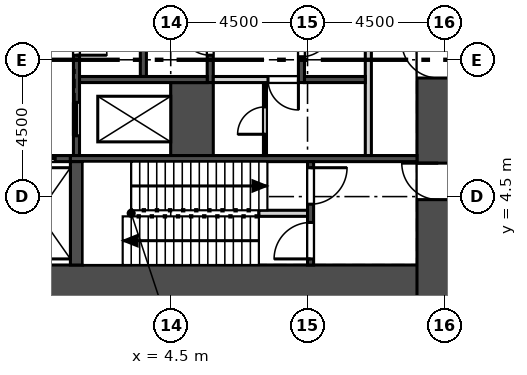
"""IFC4 building model, lengths in metres.
Left out: names, types, materials, properties, quantities, classifications, styles, units other than length and angle.
Written with IfcOpenShell. Run it as: python <this file> out.ifc"""

import sys

from ifc_helpers import new_model, si_unit, direction, frame, frame_2d, origin, place, context, subcontext, project, spatial, rectangle, extrude, element, fill, save


model = new_model("IFC4")
c1 = context("Model", 3, precision=1e-05, world=origin(), true_north=direction((0.0, 1.0)))
c2 = subcontext(c1, "Body", "Model", "MODEL_VIEW")
j1 = project(units=[si_unit("LENGTHUNIT", "METRE"), si_unit("PLANEANGLEUNIT", "RADIAN")], contexts=[c1])
p1 = place(None, origin())
s1 = spatial("IfcSite", under=j1, at=p1, CompositionType="ELEMENT")
p2 = place(p1, origin())
s2 = spatial("IfcBuilding", under=s1, at=p2, CompositionType="ELEMENT")
p3 = place(p2, frame((0.0, 0.0, 47.5)))
s3 = spatial("IfcBuildingStorey", under=s2, at=p3, CompositionType="ELEMENT", Elevation=47.5)
p4 = place(p3, frame((-14.0, 1.55, 0.0), z_axis=(0.0, 0.0, 1.0), x_axis=(1.0, 0.0, 0.0)))
e1 = element("IfcWall", 1, at=p4, inside=s3, PredefinedType="SHEAR", context=c2, shape_type="SweptSolid", body=[
    extrude(rectangle(XDim=28.0, YDim=1.4, at=frame_2d((14.0, 0.0))), origin(), (0.0, 0.0, 1.0), 5.4),
])
p5 = place(p3, frame((13.3, 0.85, 0.0), z_axis=(0.0, 0.0, 1.0), x_axis=(0.0, 1.0, 0.0)))
e2 = element("IfcWall", 2, at=p5, inside=s3, PredefinedType="SHEAR", context=c2, shape_type="SweptSolid", body=[
    extrude(rectangle(XDim=10.202, YDim=1.4, at=frame_2d((5.101, 0.0))), origin(), (0.0, 0.0, 1.0), 5.4),
])
p6 = place(p5, frame((3.55, 0.0, 0.0)))
e3 = element("IfcOpeningElement", 3, at=p6, cuts=e2, PredefinedType="OPENING", context=c2, shape_type="SweptSolid", body=[
    extrude(rectangle(XDim=1.2, YDim=2.1, at=frame_2d((0.6, 1.05))), frame((0.0, 0.71, 0.0), z_axis=(0.0, -1.0, 0.0), x_axis=(1.0, 0.0, 0.0)), (0.0, 0.0, 1.0), 1.42),
])
p7 = place(p5, frame((7.55, 0.0, 0.0)))
e4 = element("IfcOpeningElement", 4, at=p7, cuts=e2, PredefinedType="OPENING", context=c2, shape_type="SweptSolid", body=[
    extrude(rectangle(XDim=1.2, YDim=2.1, at=frame_2d((0.6, 1.05))), frame((0.0, 0.71, 0.0), z_axis=(0.0, -1.0, 0.0), x_axis=(1.0, 0.0, 0.0)), (0.0, 0.0, 1.0), 1.42),
])
p8 = place(p3, frame((31.98, 7.709, 0.0), z_axis=(0.0, 0.0, 1.0), x_axis=(-0.500000125387, 0.866025331392, 0.0)))
e5 = element("IfcWall", 5, at=p8, inside=s3, PredefinedType="SOLIDWALL", context=c2, shape_type="SweptSolid", body=[
    extrude(rectangle(XDim=55.255, YDim=0.34, at=frame_2d((27.628, 0.0))), origin(), (0.0, 0.0, 1.0), 5.1),
])
p9 = place(p8, frame((1.314, 0.0, 0.9)))
e6 = element("IfcOpeningElement", 6, at=p9, cuts=e5, PredefinedType="OPENING", context=c2, shape_type="SweptSolid", body=[
    extrude(rectangle(XDim=1.885, YDim=3.0, at=frame_2d((0.942, 1.5))), frame((0.0, 0.18, 0.0), z_axis=(0.0, -1.0, 0.0), x_axis=(1.0, 0.0, 0.0)), (0.0, 0.0, 1.0), 0.36),
])
p10 = place(p8, frame((4.314, 0.0, 0.9)))
e7 = element("IfcOpeningElement", 7, at=p10, cuts=e5, PredefinedType="OPENING", context=c2, shape_type="SweptSolid", body=[
    extrude(rectangle(XDim=1.885, YDim=3.0, at=frame_2d((0.942, 1.5))), frame((0.0, 0.18, 0.0), z_axis=(0.0, -1.0, 0.0), x_axis=(1.0, 0.0, 0.0)), (0.0, 0.0, 1.0), 0.36),
])
p11 = place(p8, frame((7.314, 0.0, 0.9)))
e8 = element("IfcOpeningElement", 8, at=p11, cuts=e5, PredefinedType="OPENING", context=c2, shape_type="SweptSolid", body=[
    extrude(rectangle(XDim=1.885, YDim=3.0, at=frame_2d((0.942, 1.5))), frame((0.0, 0.18, 0.0), z_axis=(0.0, -1.0, 0.0), x_axis=(1.0, 0.0, 0.0)), (0.0, 0.0, 1.0), 0.36),
])
p12 = place(p8, frame((10.314, 0.0, 0.9)))
e9 = element("IfcOpeningElement", 9, at=p12, cuts=e5, PredefinedType="OPENING", context=c2, shape_type="SweptSolid", body=[
    extrude(rectangle(XDim=1.885, YDim=3.0, at=frame_2d((0.942, 1.5))), frame((0.0, 0.18, 0.0), z_axis=(0.0, -1.0, 0.0), x_axis=(1.0, 0.0, 0.0)), (0.0, 0.0, 1.0), 0.36),
])
p13 = place(p8, frame((13.314, 0.0, 0.9)))
e10 = element("IfcOpeningElement", 10, at=p13, cuts=e5, PredefinedType="OPENING", context=c2, shape_type="SweptSolid", body=[
    extrude(rectangle(XDim=1.885, YDim=3.0, at=frame_2d((0.942, 1.5))), frame((0.0, 0.18, 0.0), z_axis=(0.0, -1.0, 0.0), x_axis=(1.0, 0.0, 0.0)), (0.0, 0.0, 1.0), 0.36),
])
p14 = place(p8, frame((16.314, 0.0, 0.9)))
e11 = element("IfcOpeningElement", 11, at=p14, cuts=e5, PredefinedType="OPENING", context=c2, shape_type="SweptSolid", body=[
    extrude(rectangle(XDim=1.885, YDim=3.0, at=frame_2d((0.942, 1.5))), frame((0.0, 0.18, 0.0), z_axis=(0.0, -1.0, 0.0), x_axis=(1.0, 0.0, 0.0)), (0.0, 0.0, 1.0), 0.36),
])
p15 = place(p8, frame((19.314, 0.0, 0.9)))
e12 = element("IfcOpeningElement", 12, at=p15, cuts=e5, PredefinedType="OPENING", context=c2, shape_type="SweptSolid", body=[
    extrude(rectangle(XDim=1.885, YDim=3.0, at=frame_2d((0.942, 1.5))), frame((0.0, 0.18, 0.0), z_axis=(0.0, -1.0, 0.0), x_axis=(1.0, 0.0, 0.0)), (0.0, 0.0, 1.0), 0.36),
])
p16 = place(p8, frame((22.314, 0.0, 0.9)))
e13 = element("IfcOpeningElement", 13, at=p16, cuts=e5, PredefinedType="OPENING", context=c2, shape_type="SweptSolid", body=[
    extrude(rectangle(XDim=1.885, YDim=3.0, at=frame_2d((0.942, 1.5))), frame((0.0, 0.18, 0.0), z_axis=(0.0, -1.0, 0.0), x_axis=(1.0, 0.0, 0.0)), (0.0, 0.0, 1.0), 0.36),
])
p17 = place(p8, frame((25.314, 0.0, 0.9)))
e14 = element("IfcOpeningElement", 14, at=p17, cuts=e5, PredefinedType="OPENING", context=c2, shape_type="SweptSolid", body=[
    extrude(rectangle(XDim=1.885, YDim=3.0, at=frame_2d((0.942, 1.5))), frame((0.0, 0.18, 0.0), z_axis=(0.0, -1.0, 0.0), x_axis=(1.0, 0.0, 0.0)), (0.0, 0.0, 1.0), 0.36),
])
p18 = place(p8, frame((28.314, 0.0, 0.9)))
e15 = element("IfcOpeningElement", 15, at=p18, cuts=e5, PredefinedType="OPENING", context=c2, shape_type="SweptSolid", body=[
    extrude(rectangle(XDim=1.885, YDim=3.0, at=frame_2d((0.942, 1.5))), frame((0.0, 0.18, 0.0), z_axis=(0.0, -1.0, 0.0), x_axis=(1.0, 0.0, 0.0)), (0.0, 0.0, 1.0), 0.36),
])
p19 = place(p8, frame((31.314, 0.0, 0.9)))
e16 = element("IfcOpeningElement", 16, at=p19, cuts=e5, PredefinedType="OPENING", context=c2, shape_type="SweptSolid", body=[
    extrude(rectangle(XDim=1.885, YDim=3.0, at=frame_2d((0.942, 1.5))), frame((0.0, 0.18, 0.0), z_axis=(0.0, -1.0, 0.0), x_axis=(1.0, 0.0, 0.0)), (0.0, 0.0, 1.0), 0.36),
])
p20 = place(p8, frame((34.314, 0.0, 0.9)))
e17 = element("IfcOpeningElement", 17, at=p20, cuts=e5, PredefinedType="OPENING", context=c2, shape_type="SweptSolid", body=[
    extrude(rectangle(XDim=1.885, YDim=3.0, at=frame_2d((0.942, 1.5))), frame((0.0, 0.18, 0.0), z_axis=(0.0, -1.0, 0.0), x_axis=(1.0, 0.0, 0.0)), (0.0, 0.0, 1.0), 0.36),
])
p21 = place(p8, frame((37.314, 0.0, 0.9)))
e18 = element("IfcOpeningElement", 18, at=p21, cuts=e5, PredefinedType="OPENING", context=c2, shape_type="SweptSolid", body=[
    extrude(rectangle(XDim=1.885, YDim=3.0, at=frame_2d((0.942, 1.5))), frame((0.0, 0.18, 0.0), z_axis=(0.0, -1.0, 0.0), x_axis=(1.0, 0.0, 0.0)), (0.0, 0.0, 1.0), 0.36),
])
p22 = place(p8, frame((40.314, 0.0, 0.9)))
e19 = element("IfcOpeningElement", 19, at=p22, cuts=e5, PredefinedType="OPENING", context=c2, shape_type="SweptSolid", body=[
    extrude(rectangle(XDim=1.885, YDim=3.0, at=frame_2d((0.942, 1.5))), frame((0.0, 0.18, 0.0), z_axis=(0.0, -1.0, 0.0), x_axis=(1.0, 0.0, 0.0)), (0.0, 0.0, 1.0), 0.36),
])
p23 = place(p8, frame((43.314, 0.0, 0.9)))
e20 = element("IfcOpeningElement", 20, at=p23, cuts=e5, PredefinedType="OPENING", context=c2, shape_type="SweptSolid", body=[
    extrude(rectangle(XDim=1.885, YDim=3.0, at=frame_2d((0.942, 1.5))), frame((0.0, 0.18, 0.0), z_axis=(0.0, -1.0, 0.0), x_axis=(1.0, 0.0, 0.0)), (0.0, 0.0, 1.0), 0.36),
])
p24 = place(p8, frame((46.314, 0.0, 0.9)))
e21 = element("IfcOpeningElement", 21, at=p24, cuts=e5, PredefinedType="OPENING", context=c2, shape_type="SweptSolid", body=[
    extrude(rectangle(XDim=1.885, YDim=3.0, at=frame_2d((0.942, 1.5))), frame((0.0, 0.18, 0.0), z_axis=(0.0, -1.0, 0.0), x_axis=(1.0, 0.0, 0.0)), (0.0, 0.0, 1.0), 0.36),
])
p25 = place(p8, frame((49.314, 0.0, 0.9)))
e22 = element("IfcOpeningElement", 22, at=p25, cuts=e5, PredefinedType="OPENING", context=c2, shape_type="SweptSolid", body=[
    extrude(rectangle(XDim=1.885, YDim=3.0, at=frame_2d((0.942, 1.5))), frame((0.0, 0.18, 0.0), z_axis=(0.0, -1.0, 0.0), x_axis=(1.0, 0.0, 0.0)), (0.0, 0.0, 1.0), 0.36),
])
p26 = place(p8, frame((52.314, 0.0, 0.9)))
e23 = element("IfcOpeningElement", 23, at=p26, cuts=e5, PredefinedType="OPENING", context=c2, shape_type="SweptSolid", body=[
    extrude(rectangle(XDim=1.885, YDim=3.0, at=frame_2d((0.942, 1.5))), frame((0.0, 0.18, 0.0), z_axis=(0.0, -1.0, 0.0), x_axis=(1.0, 0.0, 0.0)), (0.0, 0.0, 1.0), 0.36),
])
p27 = place(p3, frame((11.0, 5.85, 0.0), z_axis=(0.0, 0.0, 1.0), x_axis=(0.0, 1.0, 0.0)))
e24 = element("IfcWall", 24, at=p27, inside=s3, PredefinedType="SOLIDWALL", context=c2, shape_type="SweptSolid", body=[
    extrude(rectangle(XDim=7.4, YDim=0.2, at=frame_2d((3.7, 0.0))), origin(), (0.0, 0.0, 1.0), 5.1),
])
p28 = place(p3, frame((8.8, 8.25, -0.3), z_axis=(0.0, 0.0, 1.0), x_axis=(0.0, 1.0, 0.0)))
e25 = element("IfcWall", 25, at=p28, inside=s3, PredefinedType="SOLIDWALL", context=c2, shape_type="SweptSolid", body=[
    extrude(rectangle(XDim=5.2, YDim=0.2, at=frame_2d((2.6, 0.0))), origin(), (0.0, 0.0, 1.0), 5.4),
])
p29 = place(p28, frame((0.85, 0.0, 0.3)))
e26 = element("IfcOpeningElement", 26, at=p29, cuts=e25, PredefinedType="OPENING", context=c2, shape_type="SweptSolid", body=[
    extrude(rectangle(XDim=1.0, YDim=2.1, at=frame_2d((0.5, 1.05))), frame((0.0, 0.11, 0.0), z_axis=(0.0, -1.0, 0.0), x_axis=(1.0, 0.0, 0.0)), (0.0, 0.0, 1.0), 0.22),
])
p30 = place(p28, frame((3.35, 0.0, 0.3)))
e27 = element("IfcOpeningElement", 27, at=p30, cuts=e25, PredefinedType="OPENING", context=c2, shape_type="SweptSolid", body=[
    extrude(rectangle(XDim=1.0, YDim=2.1, at=frame_2d((0.5, 1.05))), frame((0.0, 0.11, 0.0), z_axis=(0.0, -1.0, 0.0), x_axis=(1.0, 0.0, 0.0)), (0.0, 0.0, 1.0), 0.22),
])
p31 = place(p3, frame((5.8, 8.25, -0.3), z_axis=(0.0, 0.0, 1.0), x_axis=(0.0, 1.0, 0.0)))
e28 = element("IfcWall", 28, at=p31, inside=s3, PredefinedType="SOLIDWALL", context=c2, shape_type="SweptSolid", body=[
    extrude(rectangle(XDim=8.0, YDim=0.2, at=frame_2d((4.0, 0.0))), origin(), (0.0, 0.0, 1.0), 5.4),
])
p32 = place(p31, frame((0.9, 0.0, 0.3)))
e29 = element("IfcOpeningElement", 29, at=p32, cuts=e28, PredefinedType="OPENING", context=c2, shape_type="SweptSolid", body=[
    extrude(rectangle(XDim=1.0, YDim=2.1, at=frame_2d((0.5, 1.05))), frame((0.0, 0.11, 0.0), z_axis=(0.0, -1.0, 0.0), x_axis=(1.0, 0.0, 0.0)), (0.0, 0.0, 1.0), 0.22),
])
p33 = place(p31, frame((3.5, 0.0, 0.3)))
e30 = element("IfcOpeningElement", 30, at=p33, cuts=e28, PredefinedType="OPENING", context=c2, shape_type="SweptSolid", body=[
    extrude(rectangle(XDim=1.0, YDim=2.1, at=frame_2d((0.5, 1.05))), frame((0.0, 0.11, 0.0), z_axis=(0.0, -1.0, 0.0), x_axis=(1.0, 0.0, 0.0)), (0.0, 0.0, 1.0), 0.22),
])
p34 = place(p31, frame((6.1, 0.0, 0.3)))
e31 = element("IfcOpeningElement", 31, at=p34, cuts=e28, PredefinedType="OPENING", context=c2, shape_type="SweptSolid", body=[
    extrude(rectangle(XDim=1.0, YDim=2.1, at=frame_2d((0.5, 1.05))), frame((0.0, 0.11, 0.0), z_axis=(0.0, -1.0, 0.0), x_axis=(1.0, 0.0, 0.0)), (0.0, 0.0, 1.0), 0.22),
])
p35 = place(p3, frame((3.6, 8.45, -0.3), z_axis=(0.0, 0.0, 1.0), x_axis=(0.0, 1.0, 0.0)))
e32 = element("IfcWall", 32, at=p35, inside=s3, PredefinedType="SOLIDWALL", context=c2, shape_type="SweptSolid", body=[
    extrude(rectangle(XDim=7.8, YDim=0.2, at=frame_2d((3.9, 0.0))), origin(), (0.0, 0.0, 1.0), 5.4),
])
p36 = place(p3, frame((1.4, 5.85, -0.3), z_axis=(0.0, 0.0, 1.0), x_axis=(0.0, 1.0, 0.0)))
e33 = element("IfcWall", 33, at=p36, inside=s3, PredefinedType="SOLIDWALL", context=c2, shape_type="SweptSolid", body=[
    extrude(rectangle(XDim=11.75, YDim=0.2, at=frame_2d((5.875, 0.0))), origin(), (0.0, 0.0, 1.0), 5.4),
])
p37 = place(p36, frame((0.65, 0.0, 0.3)))
e34 = element("IfcOpeningElement", 34, at=p37, cuts=e33, PredefinedType="OPENING", context=c2, shape_type="SweptSolid", body=[
    extrude(rectangle(XDim=1.1, YDim=2.1, at=frame_2d((0.55, 1.05))), frame((0.0, 0.11, 0.0), z_axis=(0.0, -1.0, 0.0), x_axis=(1.0, 0.0, 0.0)), (0.0, 0.0, 1.0), 0.22),
])
p38 = place(p36, frame((3.3, 0.0, 0.3)))
e35 = element("IfcOpeningElement", 35, at=p38, cuts=e33, PredefinedType="OPENING", context=c2, shape_type="SweptSolid", body=[
    extrude(rectangle(XDim=1.0, YDim=2.1, at=frame_2d((0.5, 1.05))), frame((0.0, 0.11, 0.0), z_axis=(0.0, -1.0, 0.0), x_axis=(1.0, 0.0, 0.0)), (0.0, 0.0, 1.0), 0.22),
])
p39 = place(p3, frame((5.2, 5.85, -0.3), z_axis=(0.0, 0.0, 1.0), x_axis=(0.0, 1.0, 0.0)))
e36 = element("IfcWall", 36, at=p39, inside=s3, PredefinedType="SOLIDWALL", context=c2, shape_type="SweptSolid", body=[
    extrude(rectangle(XDim=2.4, YDim=1.4, at=frame_2d((1.2, 0.0))), origin(), (0.0, 0.0, 1.0), 5.4),
])
p40 = place(p3, frame((8.9, 8.35, -0.3), z_axis=(0.0, 0.0, 1.0), x_axis=(1.0, 0.0, 0.0)))
e37 = element("IfcWall", 37, at=p40, inside=s3, PredefinedType="SOLIDWALL", context=c2, shape_type="SweptSolid", body=[
    extrude(rectangle(XDim=2.0, YDim=0.2, at=frame_2d((1.0, 0.0))), origin(), (0.0, 0.0, 1.0), 5.4),
])
p41 = place(p3, frame((1.5, 8.35, -0.3), z_axis=(0.0, 0.0, 1.0), x_axis=(1.0, 0.0, 0.0)))
e38 = element("IfcWall", 38, at=p41, inside=s3, PredefinedType="SOLIDWALL", context=c2, shape_type="SweptSolid", body=[
    extrude(rectangle(XDim=4.2, YDim=0.2, at=frame_2d((2.1, 0.0))), origin(), (0.0, 0.0, 1.0), 5.4),
])
p42 = place(p3, frame((-1.2, 5.75, -0.3), z_axis=(0.0, 0.0, 1.0), x_axis=(1.0, 0.0, 0.0)))
e39 = element("IfcWall", 39, at=p42, inside=s3, PredefinedType="SOLIDWALL", context=c2, shape_type="SweptSolid", body=[
    extrude(rectangle(XDim=2.4, YDim=0.2, at=frame_2d((1.2, 0.0))), origin(), (0.0, 0.0, 1.0), 5.4),
])
p43 = place(p42, frame((0.5, 0.0, 0.3)))
e40 = element("IfcOpeningElement", 40, at=p43, cuts=e39, PredefinedType="OPENING", context=c2, shape_type="SweptSolid", body=[
    extrude(rectangle(XDim=1.4, YDim=2.1, at=frame_2d((0.7, 1.05))), frame((0.0, 0.11, 0.0), z_axis=(0.0, -1.0, 0.0), x_axis=(1.0, 0.0, 0.0)), (0.0, 0.0, 1.0), 0.22),
])
p44 = place(p3, frame((1.2, 5.75, -0.3), z_axis=(0.0, 0.0, 1.0), x_axis=(1.0, 0.0, 0.0)))
e41 = element("IfcWall", 41, at=p44, inside=s3, PredefinedType="SOLIDWALL", context=c2, shape_type="SweptSolid", body=[
    extrude(rectangle(XDim=11.4, YDim=0.2, at=frame_2d((5.7, 0.0))), origin(), (0.0, 0.0, 1.0), 5.4),
])
p45 = place(p3, frame((9.1, 2.25, -0.3), z_axis=(0.0, 0.0, 1.0), x_axis=(0.0, 1.0, 0.0)))
e42 = element("IfcWall", 42, at=p45, inside=s3, PredefinedType="SOLIDWALL", context=c2, shape_type="SweptSolid", body=[
    extrude(rectangle(XDim=3.4, YDim=0.2, at=frame_2d((1.7, 0.0))), origin(), (0.0, 0.0, 1.0), 5.4),
])
p46 = place(p45, frame((0.2, 0.0, 0.3)))
e43 = element("IfcOpeningElement", 43, at=p46, cuts=e42, PredefinedType="OPENING", context=c2, shape_type="SweptSolid", body=[
    extrude(rectangle(XDim=1.2, YDim=2.1, at=frame_2d((0.6, 1.05))), frame((0.0, 0.11, 0.0), z_axis=(0.0, -1.0, 0.0), x_axis=(1.0, 0.0, 0.0)), (0.0, 0.0, 1.0), 0.22),
])
p47 = place(p45, frame((2.0, 0.0, 0.3)))
e44 = element("IfcOpeningElement", 44, at=p47, cuts=e42, PredefinedType="OPENING", context=c2, shape_type="SweptSolid", body=[
    extrude(rectangle(XDim=1.2, YDim=2.1, at=frame_2d((0.6, 1.05))), frame((0.0, 0.11, 0.0), z_axis=(0.0, -1.0, 0.0), x_axis=(1.0, 0.0, 0.0)), (0.0, 0.0, 1.0), 0.22),
])
p48 = place(p3, frame((1.4, 2.25, -0.3), z_axis=(0.0, 0.0, 1.0), x_axis=(0.0, 1.0, 0.0)))
e45 = element("IfcWall", 45, at=p48, inside=s3, PredefinedType="SOLIDWALL", context=c2, shape_type="SweptSolid", body=[
    extrude(rectangle(XDim=3.4, YDim=0.4, at=frame_2d((1.7, 0.0))), origin(), (0.0, 0.0, 1.0), 5.4),
])
p49 = place(p3, frame((7.6, 5.85, 0.0), z_axis=(0.0, 0.0, 1.0), x_axis=(0.0, 1.0, 0.0)))
e46 = element("IfcWall", 46, at=p49, inside=s3, PredefinedType="PARTITIONING", context=c2, shape_type="SweptSolid", body=[
    extrude(rectangle(XDim=2.4, YDim=0.1, at=frame_2d((1.2, 0.0))), origin(), (0.0, 0.0, 1.0), 5.1),
])
p50 = place(p49, frame((0.7, 0.0, 0.0)))
e47 = element("IfcOpeningElement", 47, at=p50, cuts=e46, PredefinedType="OPENING", context=c2, shape_type="SweptSolid", body=[
    extrude(rectangle(XDim=0.9, YDim=2.1, at=frame_2d((0.45, 1.05))), frame((0.0, 0.06, 0.0), z_axis=(0.0, -1.0, 0.0), x_axis=(1.0, 0.0, 0.0)), (0.0, 0.0, 1.0), 0.12),
])
p51 = place(p3, frame((5.9, 8.35, 0.0), z_axis=(0.0, 0.0, 1.0), x_axis=(1.0, 0.0, 0.0)))
e48 = element("IfcWall", 48, at=p51, inside=s3, PredefinedType="SOLIDWALL", context=c2, shape_type="SweptSolid", body=[
    extrude(rectangle(XDim=2.8, YDim=0.2, at=frame_2d((1.4, 0.0))), origin(), (0.0, 0.0, 1.0), 5.1),
])
p52 = place(p51, frame((1.8, 0.0, 0.0)))
e49 = element("IfcOpeningElement", 49, at=p52, cuts=e48, PredefinedType="OPENING", context=c2, shape_type="SweptSolid", body=[
    extrude(rectangle(XDim=1.0, YDim=2.1, at=frame_2d((0.5, 1.05))), frame((0.0, 0.11, 0.0), z_axis=(0.0, -1.0, 0.0), x_axis=(1.0, 0.0, 0.0)), (0.0, 0.0, 1.0), 0.22),
])
p53 = place(p3, frame((7.4, 3.95, 0.0), z_axis=(0.0, 0.0, 1.0), x_axis=(1.0, 0.0, 0.0)))
e50 = element("IfcWall", 50, at=p53, inside=s3, PredefinedType="SOLIDWALL", context=c2, shape_type="SweptSolid", body=[
    extrude(rectangle(XDim=1.6, YDim=0.2, at=frame_2d((0.8, 0.0))), origin(), (0.0, 0.0, 1.0), 5.1),
])
p54 = place(p37, origin())
e51 = element("IfcDoor", 51, at=p54, inside=s3, OperationType="SLIDING_TO_RIGHT", PredefinedType="DOOR", context=c2, shape_type="SweptSolid", body=[
    extrude(rectangle(XDim=1.1, YDim=2.1, at=frame_2d((0.55, 1.05))), frame((0.0, 0.025, 0.0), z_axis=(0.0, -1.0, 0.0), x_axis=(1.0, 0.0, 0.0)), (0.0, 0.0, 1.0), 0.05),
])
fill(e34, e51)
p55 = place(p43, origin())
e52 = element("IfcDoor", 52, at=p55, inside=s3, OperationType="SLIDING_TO_LEFT", PredefinedType="DOOR", context=c2, shape_type="SweptSolid", body=[
    extrude(rectangle(XDim=1.4, YDim=2.1, at=frame_2d((0.7, 1.05))), frame((0.0, 0.025, 0.0), z_axis=(0.0, -1.0, 0.0), x_axis=(1.0, 0.0, 0.0)), (0.0, 0.0, 1.0), 0.05),
])
fill(e40, e52)
p56 = place(p29, frame((1.0, 0.0, 0.0), z_axis=(0.0, 0.0, 1.0), x_axis=(-1.0, 0.0, 0.0)))
e53 = element("IfcDoor", 53, at=p56, inside=s3, OperationType="SINGLE_SWING_LEFT", PredefinedType="DOOR", context=c2, shape_type="SweptSolid", body=[
    extrude(rectangle(XDim=1.0, YDim=2.1, at=frame_2d((0.5, 1.05))), frame((0.0, 0.025, 0.0), z_axis=(0.0, -1.0, 0.0), x_axis=(1.0, 0.0, 0.0)), (0.0, 0.0, 1.0), 0.05),
])
fill(e26, e53)
p57 = place(p32, origin())
e54 = element("IfcDoor", 54, at=p57, inside=s3, OperationType="SINGLE_SWING_RIGHT", PredefinedType="DOOR", context=c2, shape_type="SweptSolid", body=[
    extrude(rectangle(XDim=1.0, YDim=2.1, at=frame_2d((0.5, 1.05))), frame((0.0, 0.025, 0.0), z_axis=(0.0, -1.0, 0.0), x_axis=(1.0, 0.0, 0.0)), (0.0, 0.0, 1.0), 0.05),
])
fill(e29, e54)
p58 = place(p38, frame((1.0, 0.0, 0.0), z_axis=(0.0, 0.0, 1.0), x_axis=(-1.0, 0.0, 0.0)))
e55 = element("IfcDoor", 55, at=p58, inside=s3, OperationType="SINGLE_SWING_RIGHT", PredefinedType="DOOR", context=c2, shape_type="SweptSolid", body=[
    extrude(rectangle(XDim=1.0, YDim=2.1, at=frame_2d((0.5, 1.05))), frame((0.0, 0.025, 0.0), z_axis=(0.0, -1.0, 0.0), x_axis=(1.0, 0.0, 0.0)), (0.0, 0.0, 1.0), 0.05),
])
fill(e35, e55)
p59 = place(p52, frame((1.0, 0.0, 0.0), z_axis=(0.0, 0.0, 1.0), x_axis=(-1.0, 0.0, 0.0)))
e56 = element("IfcDoor", 56, at=p59, inside=s3, OperationType="SINGLE_SWING_LEFT", PredefinedType="DOOR", context=c2, shape_type="SweptSolid", body=[
    extrude(rectangle(XDim=1.0, YDim=2.1, at=frame_2d((0.5, 1.05))), frame((0.0, 0.025, 0.0), z_axis=(0.0, -1.0, 0.0), x_axis=(1.0, 0.0, 0.0)), (0.0, 0.0, 1.0), 0.05),
])
fill(e49, e56)
p60 = place(p50, origin())
e57 = element("IfcDoor", 57, at=p60, inside=s3, OperationType="SINGLE_SWING_LEFT", PredefinedType="DOOR", context=c2, shape_type="SweptSolid", body=[
    extrude(rectangle(XDim=0.9, YDim=2.1, at=frame_2d((0.45, 1.05))), frame((0.0, 0.025, 0.0), z_axis=(0.0, -1.0, 0.0), x_axis=(1.0, 0.0, 0.0)), (0.0, 0.0, 1.0), 0.05),
])
fill(e47, e57)
p61 = place(p6, origin())
e58 = element("IfcDoor", 58, at=p61, inside=s3, OperationType="SINGLE_SWING_RIGHT", PredefinedType="DOOR", context=c2, shape_type="SweptSolid", body=[
    extrude(rectangle(XDim=1.2, YDim=2.1, at=frame_2d((0.6, 1.05))), frame((0.0, 0.025, 0.0), z_axis=(0.0, -1.0, 0.0), x_axis=(1.0, 0.0, 0.0)), (0.0, 0.0, 1.0), 0.05),
])
fill(e3, e58)
p62 = place(p46, origin())
e59 = element("IfcDoor", 59, at=p62, inside=s3, OperationType="SINGLE_SWING_LEFT", PredefinedType="DOOR", context=c2, shape_type="SweptSolid", body=[
    extrude(rectangle(XDim=1.2, YDim=2.1, at=frame_2d((0.6, 1.05))), frame((0.0, 0.025, 0.0), z_axis=(0.0, -1.0, 0.0), x_axis=(1.0, 0.0, 0.0)), (0.0, 0.0, 1.0), 0.05),
])
fill(e43, e59)
p63 = place(p7, origin())
e60 = element("IfcDoor", 60, at=p63, inside=s3, OperationType="SINGLE_SWING_RIGHT", PredefinedType="DOOR", context=c2, shape_type="SweptSolid", body=[
    extrude(rectangle(XDim=1.2, YDim=2.1, at=frame_2d((0.6, 1.05))), frame((0.0, 0.025, 0.0), z_axis=(0.0, -1.0, 0.0), x_axis=(1.0, 0.0, 0.0)), (0.0, 0.0, 1.0), 0.05),
])
fill(e4, e60)
p64 = place(p47, frame((1.2, 0.0, 0.0), z_axis=(0.0, 0.0, 1.0), x_axis=(-1.0, 0.0, 0.0)))
e61 = element("IfcDoor", 61, at=p64, inside=s3, OperationType="SINGLE_SWING_LEFT", PredefinedType="DOOR", context=c2, shape_type="SweptSolid", body=[
    extrude(rectangle(XDim=1.2, YDim=2.1, at=frame_2d((0.6, 1.05))), frame((0.0, 0.025, 0.0), z_axis=(0.0, -1.0, 0.0), x_axis=(1.0, 0.0, 0.0)), (0.0, 0.0, 1.0), 0.05),
])
fill(e44, e61)
save(model, sys.argv[1])
